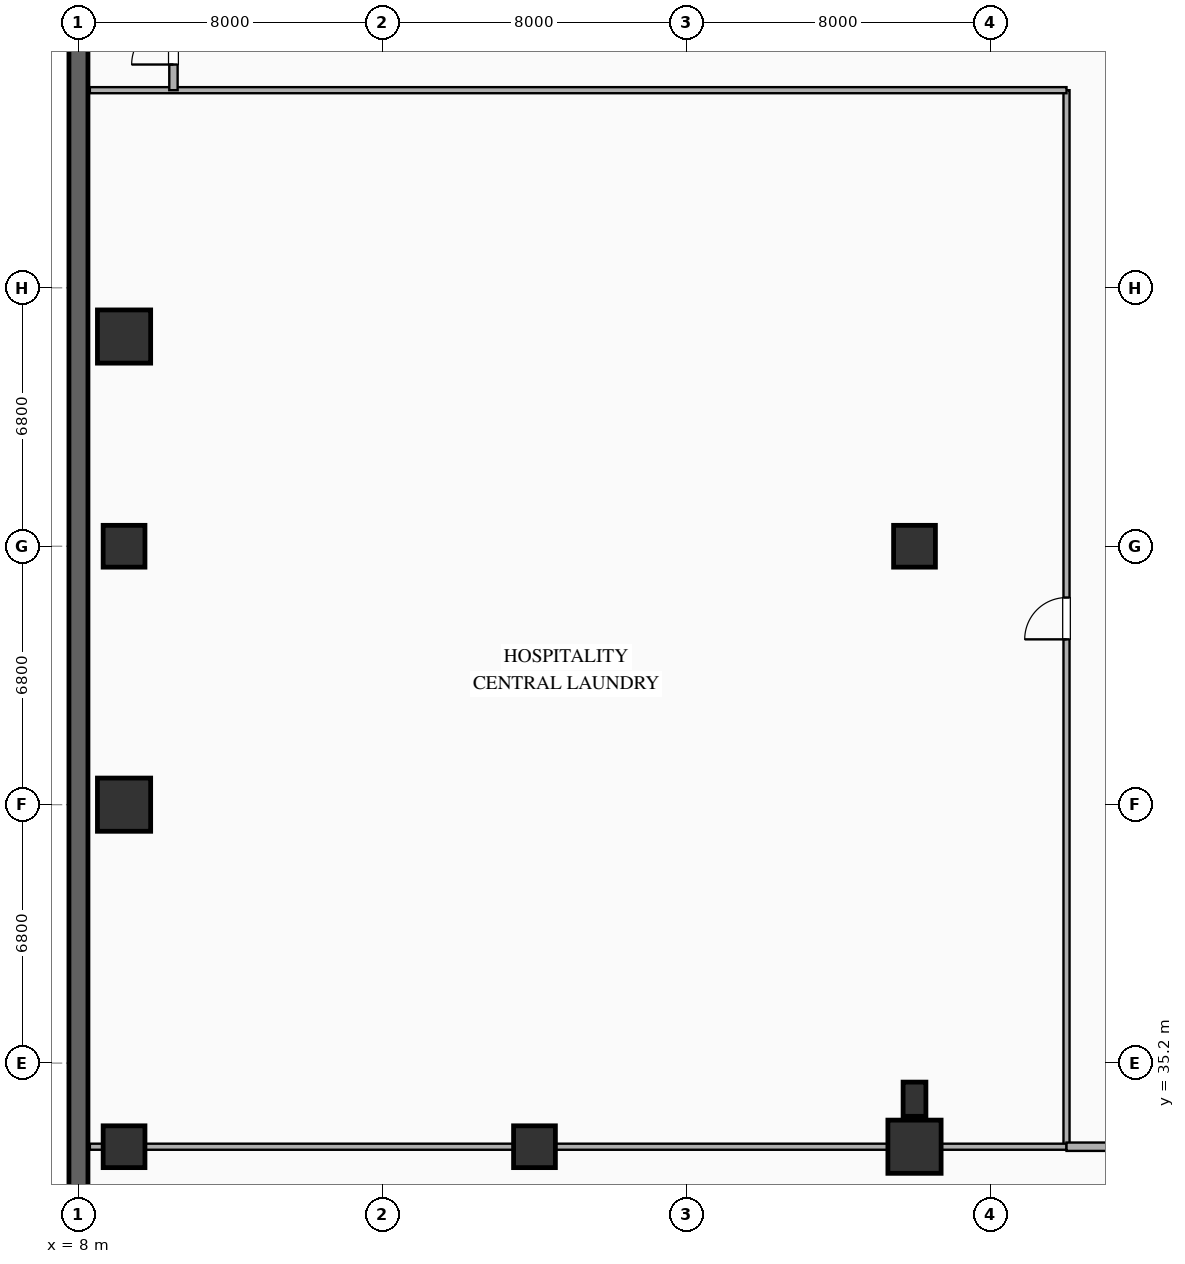
"""IFC4 building model, lengths in metres.
Left out: names, types, materials, properties, quantities, classifications, styles, units other than length and angle.
Written with IfcOpenShell. Run it as: python <this file> out.ifc"""

import sys

from ifc_helpers import new_model, si_unit, direction, frame, frame_2d, origin, origin_2d, place, context, subcontext, project, spatial, rectangle, extrude, element, fill, save


model = new_model("IFC4")
c1 = context("Model", 3, precision=1e-05, world=origin(), true_north=direction((0.0, 1.0)))
c2 = subcontext(c1, "Body", "Model", "MODEL_VIEW")
j1 = project(units=[si_unit("LENGTHUNIT", "METRE"), si_unit("PLANEANGLEUNIT", "RADIAN")], contexts=[c1])
p1 = place(None, origin())
s1 = spatial("IfcSite", under=j1, at=p1, CompositionType="ELEMENT")
p2 = place(p1, origin())
s2 = spatial("IfcBuilding", under=s1, at=p2, CompositionType="ELEMENT")
p3 = place(p2, frame((0.0, 0.0, -4.5)))
s3 = spatial("IfcBuildingStorey", under=s2, at=p3, CompositionType="ELEMENT", Elevation=-4.5)
p4 = place(p3, frame((8.0, 76.0, 0.0), z_axis=(0.0, 0.0, 1.0), x_axis=(0.0, -1.0, 0.0)))
e1 = element("IfcWall", 1, at=p4, inside=s3, PredefinedType="SOLIDWALL", context=c2, shape_type="SweptSolid", body=[
    extrude(rectangle(XDim=68.0, YDim=0.5, at=frame_2d((34.0, 0.0))), origin(), (0.0, 0.0, 1.0), 4.22),
])
for number, where, z_axis, x_axis in (
    (2, (9.2, 33.0, 0.0), (0.0, 0.0, 1.0), (1.0, 0.0, 0.0)),
    (3, (9.2, 48.8, 0.0), (0.0, 0.0, 1.0), (1.0, 0.0, 0.0)),
    (4, (20.0, 33.0, 0.0), (0.0, 0.0, 1.0), (1.0, 0.0, 0.0)),
):
    element("IfcColumn", number, at=place(p3, frame(where, z_axis=z_axis, x_axis=x_axis)), inside=s3, PredefinedType="COLUMN", context=c2, shape_type="SweptSolid", body=[
        extrude(rectangle(XDim=1.1, YDim=1.1, at=origin_2d()), origin(), (0.0, 0.0, 1.0), 4.22),
    ])
p5 = place(p3, frame((30.0, 33.0, 0.0), z_axis=(0.0, 0.0, 1.0), x_axis=(1.0, 0.0, 0.0)))
e5 = element("IfcColumn", 5, at=p5, inside=s3, PredefinedType="COLUMN", context=c2, shape_type="SweptSolid", body=[
    extrude(rectangle(XDim=1.4, YDim=1.4, at=origin_2d()), origin(), (0.0, 0.0, 1.0), 4.22),
])
p6 = place(p3, frame((30.0, 48.8, 0.0), z_axis=(0.0, 0.0, 1.0), x_axis=(1.0, 0.0, 0.0)))
e6 = element("IfcColumn", 6, at=p6, inside=s3, PredefinedType="COLUMN", context=c2, shape_type="SweptSolid", body=[
    extrude(rectangle(XDim=1.1, YDim=1.1, at=origin_2d()), origin(), (0.0, 0.0, 1.0), 4.22),
])
for number, where, z_axis, x_axis in (
    (7, (9.2, 54.318, 0.0), (0.0, 0.0, 1.0), (1.0, 0.0, 0.0)),
    (8, (9.2, 42.0, 0.0), (0.0, 0.0, 1.0), (1.0, 0.0, 0.0)),
):
    element("IfcColumn", number, at=place(p3, frame(where, z_axis=z_axis, x_axis=x_axis)), inside=s3, PredefinedType="COLUMN", context=c2, shape_type="SweptSolid", body=[
        extrude(rectangle(XDim=1.4, YDim=1.4, at=origin_2d()), origin(), (0.0, 0.0, 1.0), 4.22),
    ])
p7 = place(p3, frame((30.0, 34.25, 0.0), z_axis=(0.0, 0.0, 1.0), x_axis=(1.0, 0.0, 0.0)))
e9 = element("IfcColumn", 9, at=p7, inside=s3, PredefinedType="PILASTER", context=c2, shape_type="SweptSolid", body=[
    extrude(rectangle(XDim=0.6, YDim=0.9, at=origin_2d()), origin(), (0.0, 0.0, 1.0), 4.22),
])
p8 = place(p3, frame((34.0, 33.0, 0.0), z_axis=(0.0, 0.0, 1.0), x_axis=(0.0, 1.0, 0.0)))
e10 = element("IfcWall", 10, at=p8, inside=s3, PredefinedType="PLUMBINGWALL", context=c2, shape_type="SweptSolid", body=[
    extrude(rectangle(XDim=27.8, YDim=0.16, at=frame_2d((13.9, 0.0))), origin(), (0.0, 0.0, 1.0), 3.42),
])
p9 = place(p8, frame((13.35, 0.0, 0.0)))
e11 = element("IfcOpeningElement", 11, at=p9, cuts=e10, PredefinedType="OPENING", context=c2, shape_type="SweptSolid", body=[
    extrude(rectangle(XDim=1.1, YDim=2.2, at=frame_2d((0.55, 1.1))), frame((0.0, 0.09, 0.0), z_axis=(0.0, -1.0, 0.0), x_axis=(1.0, 0.0, 0.0)), (0.0, 0.0, 1.0), 0.18),
])
for number, where, z_axis, x_axis in (
    (12, (34.0, 33.0, 0.0), (0.0, 0.0, 1.0), (-1.0, 0.0, 0.0)),
    (13, (34.0, 60.8, 0.0), (0.0, 0.0, 1.0), (-1.0, 0.0, 0.0)),
):
    element("IfcWall", number, at=place(p3, frame(where, z_axis=z_axis, x_axis=x_axis)), inside=s3, PredefinedType="PLUMBINGWALL", context=c2, shape_type="SweptSolid", body=[
        extrude(rectangle(XDim=25.7, YDim=0.16, at=frame_2d((12.85, 0.0))), origin(), (0.0, 0.0, 1.0), 3.42),
    ])
p10 = place(p3, frame((62.0, 33.0, 0.0), z_axis=(0.0, 0.0, 1.0), x_axis=(-1.0, 0.0, 0.0)))
e14 = element("IfcWall", 14, at=p10, inside=s3, PredefinedType="SOLIDWALL", context=c2, shape_type="SweptSolid", body=[
    extrude(rectangle(XDim=28.0, YDim=0.22, at=frame_2d((14.0, 0.0))), origin(), (0.0, 0.0, 1.0), 3.42),
])
p11 = place(p10, frame((20.434, 0.0, 0.0)))
e15 = element("IfcOpeningElement", 15, at=p11, cuts=e14, PredefinedType="OPENING", context=c2, shape_type="SweptSolid", body=[
    extrude(rectangle(XDim=1.1, YDim=2.2, at=frame_2d((0.55, 1.1))), frame((0.0, 0.12, 0.0), z_axis=(0.0, -1.0, 0.0), x_axis=(1.0, 0.0, 0.0)), (0.0, 0.0, 1.0), 0.24),
])
p12 = place(p10, frame((6.466, 0.0, 0.0)))
e16 = element("IfcOpeningElement", 16, at=p12, cuts=e14, PredefinedType="OPENING", context=c2, shape_type="SweptSolid", body=[
    extrude(rectangle(XDim=1.1, YDim=2.2, at=frame_2d((0.55, 1.1))), frame((0.0, 0.12, 0.0), z_axis=(0.0, -1.0, 0.0), x_axis=(1.0, 0.0, 0.0)), (0.0, 0.0, 1.0), 0.24),
])
p13 = place(p3, frame((10.5, 60.8, 0.0), z_axis=(0.0, 0.0, 1.0), x_axis=(0.0, 1.0, 0.0)))
e17 = element("IfcWall", 17, at=p13, inside=s3, PredefinedType="SOLIDWALL", context=c2, shape_type="SweptSolid", body=[
    extrude(rectangle(XDim=3.05, YDim=0.22, at=frame_2d((1.525, 0.0))), origin(), (0.0, 0.0, 1.0), 3.42),
])
p14 = place(p13, frame((0.675, 0.0, 0.0)))
e18 = element("IfcOpeningElement", 18, at=p14, cuts=e17, PredefinedType="OPENING", context=c2, shape_type="SweptSolid", body=[
    extrude(rectangle(XDim=1.1, YDim=2.2, at=frame_2d((0.55, 1.1))), frame((0.0, 0.12, 0.0), z_axis=(0.0, -1.0, 0.0), x_axis=(1.0, 0.0, 0.0)), (0.0, 0.0, 1.0), 0.24),
])
p15 = place(p9, origin())
e19 = element("IfcDoor", 19, at=p15, inside=s3, OperationType="SINGLE_SWING_LEFT", PredefinedType="DOOR", context=c2, shape_type="SweptSolid", body=[
    extrude(rectangle(XDim=1.1, YDim=2.2, at=frame_2d((0.55, 1.1))), frame((0.0, 0.025, 0.0), z_axis=(0.0, -1.0, 0.0), x_axis=(1.0, 0.0, 0.0)), (0.0, 0.0, 1.0), 0.05),
])
fill(e11, e19)
p16 = place(p14, origin())
e20 = element("IfcDoor", 20, at=p16, inside=s3, OperationType="SINGLE_SWING_LEFT", PredefinedType="DOOR", context=c2, shape_type="SweptSolid", body=[
    extrude(rectangle(XDim=1.1, YDim=2.2, at=frame_2d((0.55, 1.1))), frame((0.0, 0.025, 0.0), z_axis=(0.0, -1.0, 0.0), x_axis=(1.0, 0.0, 0.0)), (0.0, 0.0, 1.0), 0.05),
])
fill(e18, e20)
save(model, sys.argv[1])
